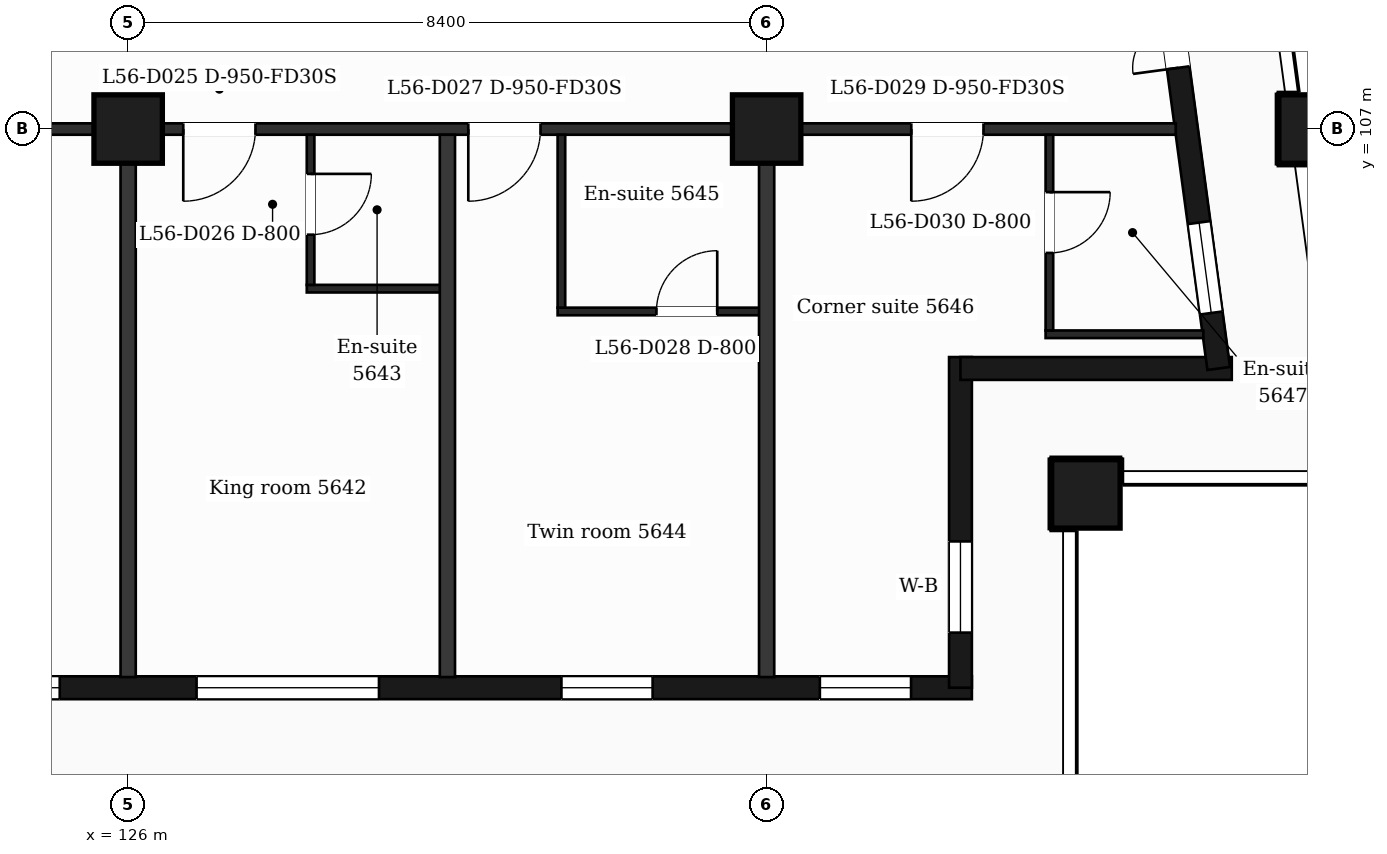
"""IFC4 building model, lengths in metres.
Left out: names, types, materials, properties, quantities, classifications, styles, units other than length and angle.
Written with IfcOpenShell. Run it as: python <this file> out.ifc"""

import sys

from ifc_helpers import new_model, si_unit, direction, frame, frame_2d, origin, origin_2d, place, context, subcontext, project, spatial, rectangle, extrude, element, fill, save


model = new_model("IFC4")
c1 = context("Model", 3, precision=1e-05, world=origin(), true_north=direction((0.0, 1.0)))
c2 = subcontext(c1, "Body", "Model", "MODEL_VIEW")
j1 = project(units=[si_unit("LENGTHUNIT", "METRE"), si_unit("PLANEANGLEUNIT", "RADIAN")], contexts=[c1])
p1 = place(None, origin())
s1 = spatial("IfcSite", under=j1, at=p1, CompositionType="ELEMENT")
p2 = place(p1, origin())
s2 = spatial("IfcBuilding", under=s1, at=p2, CompositionType="ELEMENT")
p3 = place(p2, frame((0.0, 0.0, 231.8)))
s3 = spatial("IfcBuildingStorey", under=s2, at=p3, CompositionType="ELEMENT", Elevation=231.8)
for number, where, z_axis, x_axis in (
    (1, (138.6, 102.2, 0.0), (0.0, 0.0, 1.0), (1.0, 0.0, 0.0)),
    (2, (126.0, 107.0, 0.0), (0.0, 0.0, 1.0), (1.0, 0.0, 0.0)),
    (3, (134.4, 107.0, 0.0), (0.0, 0.0, 1.0), (1.0, 0.0, 0.0)),
    (4, (141.588, 107.0, 0.0), (0.0, 0.0, 1.0), (1.0, 0.0, 0.0)),
):
    element("IfcColumn", number, at=place(p3, frame(where, z_axis=z_axis, x_axis=x_axis)), inside=s3, PredefinedType="COLUMN", context=c2, shape_type="SweptSolid", body=[
        extrude(rectangle(XDim=0.9, YDim=0.9, at=origin_2d()), origin(), (0.0, 0.0, 1.0), 3.7),
    ])
p4 = place(p3, frame((89.85, 99.65, 0.0), z_axis=(0.0, 0.0, 1.0), x_axis=(1.0, 0.0, 0.0)))
e5 = element("IfcWall", 5, at=p4, inside=s3, PredefinedType="SOLIDWALL", context=c2, shape_type="SweptSolid", body=[
    extrude(rectangle(XDim=47.25, YDim=0.3, at=frame_2d((23.625, 0.0))), origin(), (0.0, 0.0, 1.0), 3.38),
])
p5 = place(p4, frame((0.725, 0.0, 0.9)))
e6 = element("IfcOpeningElement", 6, at=p5, cuts=e5, PredefinedType="OPENING", context=c2, shape_type="SweptSolid", body=[
    extrude(rectangle(XDim=1.2, YDim=2.1, at=frame_2d((0.6, 1.05))), frame((0.0, 0.16, 0.0), z_axis=(0.0, -1.0, 0.0), x_axis=(1.0, 0.0, 0.0)), (0.0, 0.0, 1.0), 0.32),
])
p6 = place(p4, frame((3.45, 0.0, 0.9)))
e7 = element("IfcOpeningElement", 7, at=p6, cuts=e5, PredefinedType="OPENING", context=c2, shape_type="SweptSolid", body=[
    extrude(rectangle(XDim=2.4, YDim=2.1, at=frame_2d((1.2, 1.05))), frame((0.0, 0.16, 0.0), z_axis=(0.0, -1.0, 0.0), x_axis=(1.0, 0.0, 0.0)), (0.0, 0.0, 1.0), 0.32),
])
p7 = place(p4, frame((7.65, 0.0, 0.9)))
e8 = element("IfcOpeningElement", 8, at=p7, cuts=e5, PredefinedType="OPENING", context=c2, shape_type="SweptSolid", body=[
    extrude(rectangle(XDim=2.4, YDim=2.1, at=frame_2d((1.2, 1.05))), frame((0.0, 0.16, 0.0), z_axis=(0.0, -1.0, 0.0), x_axis=(1.0, 0.0, 0.0)), (0.0, 0.0, 1.0), 0.32),
])
p8 = place(p4, frame((12.45, 0.0, 0.9)))
e9 = element("IfcOpeningElement", 9, at=p8, cuts=e5, PredefinedType="OPENING", context=c2, shape_type="SweptSolid", body=[
    extrude(rectangle(XDim=1.2, YDim=2.1, at=frame_2d((0.6, 1.05))), frame((0.0, 0.16, 0.0), z_axis=(0.0, -1.0, 0.0), x_axis=(1.0, 0.0, 0.0)), (0.0, 0.0, 1.0), 0.32),
])
p9 = place(p4, frame((16.65, 0.0, 0.9)))
e10 = element("IfcOpeningElement", 10, at=p9, cuts=e5, PredefinedType="OPENING", context=c2, shape_type="SweptSolid", body=[
    extrude(rectangle(XDim=1.2, YDim=2.1, at=frame_2d((0.6, 1.05))), frame((0.0, 0.16, 0.0), z_axis=(0.0, -1.0, 0.0), x_axis=(1.0, 0.0, 0.0)), (0.0, 0.0, 1.0), 0.32),
])
p10 = place(p4, frame((19.95, 0.0, 0.0)))
e11 = element("IfcOpeningElement", 11, at=p10, cuts=e5, PredefinedType="OPENING", context=c2, shape_type="SweptSolid", body=[
    extrude(rectangle(XDim=1.2, YDim=2.4, at=frame_2d((0.6, 1.2))), frame((0.0, 0.16, 0.0), z_axis=(0.0, -1.0, 0.0), x_axis=(1.0, 0.0, 0.0)), (0.0, 0.0, 1.0), 0.32),
])
p11 = place(p4, frame((21.75, 0.0, 0.9)))
e12 = element("IfcOpeningElement", 12, at=p11, cuts=e5, PredefinedType="OPENING", context=c2, shape_type="SweptSolid", body=[
    extrude(rectangle(XDim=1.2, YDim=2.1, at=frame_2d((0.6, 1.05))), frame((0.0, 0.16, 0.0), z_axis=(0.0, -1.0, 0.0), x_axis=(1.0, 0.0, 0.0)), (0.0, 0.0, 1.0), 0.32),
])
p12 = place(p4, frame((24.45, 0.0, 0.9)))
e13 = element("IfcOpeningElement", 13, at=p12, cuts=e5, PredefinedType="OPENING", context=c2, shape_type="SweptSolid", body=[
    extrude(rectangle(XDim=2.4, YDim=2.1, at=frame_2d((1.2, 1.05))), frame((0.0, 0.16, 0.0), z_axis=(0.0, -1.0, 0.0), x_axis=(1.0, 0.0, 0.0)), (0.0, 0.0, 1.0), 0.32),
])
p13 = place(p4, frame((28.35, 0.0, 0.0)))
e14 = element("IfcOpeningElement", 14, at=p13, cuts=e5, PredefinedType="OPENING", context=c2, shape_type="SweptSolid", body=[
    extrude(rectangle(XDim=1.2, YDim=2.4, at=frame_2d((0.6, 1.2))), frame((0.0, 0.16, 0.0), z_axis=(0.0, -1.0, 0.0), x_axis=(1.0, 0.0, 0.0)), (0.0, 0.0, 1.0), 0.32),
])
p14 = place(p4, frame((30.15, 0.0, 0.9)))
e15 = element("IfcOpeningElement", 15, at=p14, cuts=e5, PredefinedType="OPENING", context=c2, shape_type="SweptSolid", body=[
    extrude(rectangle(XDim=1.2, YDim=2.1, at=frame_2d((0.6, 1.05))), frame((0.0, 0.16, 0.0), z_axis=(0.0, -1.0, 0.0), x_axis=(1.0, 0.0, 0.0)), (0.0, 0.0, 1.0), 0.32),
])
p15 = place(p4, frame((32.85, 0.0, 0.9)))
e16 = element("IfcOpeningElement", 16, at=p15, cuts=e5, PredefinedType="OPENING", context=c2, shape_type="SweptSolid", body=[
    extrude(rectangle(XDim=2.4, YDim=2.1, at=frame_2d((1.2, 1.05))), frame((0.0, 0.16, 0.0), z_axis=(0.0, -1.0, 0.0), x_axis=(1.0, 0.0, 0.0)), (0.0, 0.0, 1.0), 0.32),
])
p16 = place(p4, frame((37.05, 0.0, 0.9)))
e17 = element("IfcOpeningElement", 17, at=p16, cuts=e5, PredefinedType="OPENING", context=c2, shape_type="SweptSolid", body=[
    extrude(rectangle(XDim=2.4, YDim=2.1, at=frame_2d((1.2, 1.05))), frame((0.0, 0.16, 0.0), z_axis=(0.0, -1.0, 0.0), x_axis=(1.0, 0.0, 0.0)), (0.0, 0.0, 1.0), 0.32),
])
p17 = place(p4, frame((41.85, 0.0, 0.9)))
e18 = element("IfcOpeningElement", 18, at=p17, cuts=e5, PredefinedType="OPENING", context=c2, shape_type="SweptSolid", body=[
    extrude(rectangle(XDim=1.2, YDim=2.1, at=frame_2d((0.6, 1.05))), frame((0.0, 0.16, 0.0), z_axis=(0.0, -1.0, 0.0), x_axis=(1.0, 0.0, 0.0)), (0.0, 0.0, 1.0), 0.32),
])
p18 = place(p4, frame((45.25, 0.0, 0.9)))
e19 = element("IfcOpeningElement", 19, at=p18, cuts=e5, PredefinedType="OPENING", context=c2, shape_type="SweptSolid", body=[
    extrude(rectangle(XDim=1.2, YDim=2.1, at=frame_2d((0.6, 1.05))), frame((0.0, 0.16, 0.0), z_axis=(0.0, -1.0, 0.0), x_axis=(1.0, 0.0, 0.0)), (0.0, 0.0, 1.0), 0.32),
])
p19 = place(p3, frame((136.95, 99.65, 0.0), z_axis=(0.0, 0.0, 1.0), x_axis=(0.0, 1.0, 0.0)))
e20 = element("IfcWall", 20, at=p19, inside=s3, PredefinedType="SOLIDWALL", context=c2, shape_type="SweptSolid", body=[
    extrude(rectangle(XDim=4.35, YDim=0.3, at=frame_2d((2.175, 0.0))), origin(), (0.0, 0.0, 1.0), 3.38),
])
p20 = place(p19, frame((0.725, 0.0, 0.9)))
e21 = element("IfcOpeningElement", 21, at=p20, cuts=e20, PredefinedType="OPENING", context=c2, shape_type="SweptSolid", body=[
    extrude(rectangle(XDim=1.2, YDim=2.1, at=frame_2d((0.6, 1.05))), frame((0.0, 0.16, 0.0), z_axis=(0.0, -1.0, 0.0), x_axis=(1.0, 0.0, 0.0)), (0.0, 0.0, 1.0), 0.32),
])
p21 = place(p3, frame((136.95, 103.85, 0.0), z_axis=(0.0, 0.0, 1.0), x_axis=(1.0, 0.0, 0.0)))
e22 = element("IfcWall", 22, at=p21, inside=s3, PredefinedType="SOLIDWALL", context=c2, shape_type="SweptSolid", body=[
    extrude(rectangle(XDim=3.569, YDim=0.3, at=frame_2d((1.785, 0.0))), origin(), (0.0, 0.0, 1.0), 3.38),
])
p22 = place(p3, frame((140.348, 103.85, 0.0), z_axis=(0.0, 0.0, 1.0), x_axis=(-0.133431549479, 0.991058031401, 0.0)))
e23 = element("IfcWall", 23, at=p22, inside=s3, PredefinedType="SOLIDWALL", context=c2, shape_type="SweptSolid", body=[
    extrude(rectangle(XDim=6.609, YDim=0.3, at=frame_2d((3.304, 0.0))), origin(), (0.0, 0.0, 1.0), 3.38),
])
p23 = place(p22, frame((0.737, 0.0, 0.9)))
e24 = element("IfcOpeningElement", 24, at=p23, cuts=e23, PredefinedType="OPENING", context=c2, shape_type="SweptSolid", body=[
    extrude(rectangle(XDim=1.2, YDim=2.1, at=frame_2d((0.6, 1.05))), frame((0.0, 0.16, 0.0), z_axis=(0.0, -1.0, 0.0), x_axis=(1.0, 0.0, 0.0)), (0.0, 0.0, 1.0), 0.32),
])
p24 = place(p22, frame((3.991, 0.0, 0.0)))
e25 = element("IfcOpeningElement", 25, at=p24, cuts=e23, PredefinedType="OPENING", context=c2, shape_type="SweptSolid", body=[
    extrude(rectangle(XDim=1.2, YDim=2.4, at=frame_2d((0.6, 1.2))), frame((0.0, 0.16, 0.0), z_axis=(0.0, -1.0, 0.0), x_axis=(1.0, 0.0, 0.0)), (0.0, 0.0, 1.0), 0.32),
])
p25 = place(p3, frame((138.07, 104.3, 0.0), z_axis=(0.0, 0.0, 1.0), x_axis=(1.0, 0.0, 0.0)))
e26 = element("IfcWall", 26, at=p25, inside=s3, PredefinedType="PARTITIONING", context=c2, shape_type="SweptSolid", body=[
    extrude(rectangle(XDim=2.076, YDim=0.1, at=frame_2d((1.038, 0.0))), origin(), (0.0, 0.0, 1.0), 3.38),
])
p26 = place(p3, frame((131.65, 104.6, 0.0), z_axis=(0.0, 0.0, 1.0), x_axis=(1.0, 0.0, 0.0)))
e27 = element("IfcWall", 27, at=p26, inside=s3, PredefinedType="PARTITIONING", context=c2, shape_type="SweptSolid", body=[
    extrude(rectangle(XDim=2.75, YDim=0.1, at=frame_2d((1.375, 0.0))), origin(), (0.0, 0.0, 1.0), 3.38),
])
p27 = place(p26, frame((1.3, 0.0, 0.0)))
e28 = element("IfcOpeningElement", 28, at=p27, cuts=e27, PredefinedType="OPENING", context=c2, shape_type="SweptSolid", body=[
    extrude(rectangle(XDim=0.8, YDim=2.1, at=frame_2d((0.4, 1.05))), frame((0.0, 0.06, 0.0), z_axis=(0.0, -1.0, 0.0), x_axis=(1.0, 0.0, 0.0)), (0.0, 0.0, 1.0), 0.12),
])
p28 = place(p3, frame((128.35, 104.9, 0.0), z_axis=(0.0, 0.0, 1.0), x_axis=(1.0, 0.0, 0.0)))
e29 = element("IfcWall", 29, at=p28, inside=s3, PredefinedType="PARTITIONING", context=c2, shape_type="SweptSolid", body=[
    extrude(rectangle(XDim=1.85, YDim=0.1, at=frame_2d((0.925, 0.0))), origin(), (0.0, 0.0, 1.0), 3.38),
])
p29 = place(p3, frame((87.018, 107.0, 0.0), z_axis=(0.0, 0.0, 1.0), x_axis=(1.0, 0.0, 0.0)))
e30 = element("IfcWall", 30, at=p29, inside=s3, PredefinedType="PARTITIONING", context=c2, shape_type="SweptSolid", body=[
    extrude(rectangle(XDim=52.765, YDim=0.15, at=frame_2d((26.382, 0.0))), origin(), (0.0, 0.0, 1.0), 3.38),
])
p30 = place(p29, frame((0.707, 0.0, 0.0)))
e31 = element("IfcOpeningElement", 31, at=p30, cuts=e30, PredefinedType="OPENING", context=c2, shape_type="SweptSolid", body=[
    extrude(rectangle(XDim=0.95, YDim=2.1, at=frame_2d((0.475, 1.05))), frame((0.0, 0.085, 0.0), z_axis=(0.0, -1.0, 0.0), x_axis=(1.0, 0.0, 0.0)), (0.0, 0.0, 1.0), 0.17),
])
p31 = place(p29, frame((8.412, 0.0, 0.0)))
e32 = element("IfcOpeningElement", 32, at=p31, cuts=e30, PredefinedType="OPENING", context=c2, shape_type="SweptSolid", body=[
    extrude(rectangle(XDim=1.0, YDim=2.1, at=frame_2d((0.5, 1.05))), frame((0.0, 0.085, 0.0), z_axis=(0.0, -1.0, 0.0), x_axis=(1.0, 0.0, 0.0)), (0.0, 0.0, 1.0), 0.17),
])
p32 = place(p29, frame((20.482, 0.0, 0.0)))
e33 = element("IfcOpeningElement", 33, at=p32, cuts=e30, PredefinedType="OPENING", context=c2, shape_type="SweptSolid", body=[
    extrude(rectangle(XDim=1.0, YDim=2.1, at=frame_2d((0.5, 1.05))), frame((0.0, 0.085, 0.0), z_axis=(0.0, -1.0, 0.0), x_axis=(1.0, 0.0, 0.0)), (0.0, 0.0, 1.0), 0.17),
])
p33 = place(p29, frame((22.882, 0.0, 0.0)))
e34 = element("IfcOpeningElement", 34, at=p33, cuts=e30, PredefinedType="OPENING", context=c2, shape_type="SweptSolid", body=[
    extrude(rectangle(XDim=1.0, YDim=2.1, at=frame_2d((0.5, 1.05))), frame((0.0, 0.085, 0.0), z_axis=(0.0, -1.0, 0.0), x_axis=(1.0, 0.0, 0.0)), (0.0, 0.0, 1.0), 0.17),
])
p34 = place(p29, frame((32.607, 0.0, 0.0)))
e35 = element("IfcOpeningElement", 35, at=p34, cuts=e30, PredefinedType="OPENING", context=c2, shape_type="SweptSolid", body=[
    extrude(rectangle(XDim=1.0, YDim=2.1, at=frame_2d((0.5, 1.05))), frame((0.0, 0.085, 0.0), z_axis=(0.0, -1.0, 0.0), x_axis=(1.0, 0.0, 0.0)), (0.0, 0.0, 1.0), 0.17),
])
p35 = place(p29, frame((39.707, 0.0, 0.0)))
e36 = element("IfcOpeningElement", 36, at=p35, cuts=e30, PredefinedType="OPENING", context=c2, shape_type="SweptSolid", body=[
    extrude(rectangle(XDim=0.95, YDim=2.1, at=frame_2d((0.475, 1.05))), frame((0.0, 0.085, 0.0), z_axis=(0.0, -1.0, 0.0), x_axis=(1.0, 0.0, 0.0)), (0.0, 0.0, 1.0), 0.17),
])
p36 = place(p29, frame((43.457, 0.0, 0.0)))
e37 = element("IfcOpeningElement", 37, at=p36, cuts=e30, PredefinedType="OPENING", context=c2, shape_type="SweptSolid", body=[
    extrude(rectangle(XDim=0.95, YDim=2.1, at=frame_2d((0.475, 1.05))), frame((0.0, 0.085, 0.0), z_axis=(0.0, -1.0, 0.0), x_axis=(1.0, 0.0, 0.0)), (0.0, 0.0, 1.0), 0.17),
])
p37 = place(p29, frame((49.285, 0.0, 0.0)))
e38 = element("IfcOpeningElement", 38, at=p37, cuts=e30, PredefinedType="OPENING", context=c2, shape_type="SweptSolid", body=[
    extrude(rectangle(XDim=0.95, YDim=2.1, at=frame_2d((0.475, 1.05))), frame((0.0, 0.085, 0.0), z_axis=(0.0, -1.0, 0.0), x_axis=(1.0, 0.0, 0.0)), (0.0, 0.0, 1.0), 0.17),
])
p38 = place(p3, frame((126.0, 99.79, 0.0), z_axis=(0.0, 0.0, 1.0), x_axis=(0.0, 1.0, 0.0)))
e39 = element("IfcWall", 39, at=p38, inside=s3, PredefinedType="PARTITIONING", context=c2, shape_type="SweptSolid", body=[
    extrude(rectangle(XDim=7.135, YDim=0.2, at=frame_2d((3.567, 0.0))), origin(), (0.0, 0.0, 1.0), 3.38),
])
p39 = place(p3, frame((128.4, 104.95, 0.0), z_axis=(0.0, 0.0, 1.0), x_axis=(0.0, 1.0, 0.0)))
e40 = element("IfcWall", 40, at=p39, inside=s3, PredefinedType="PARTITIONING", context=c2, shape_type="SweptSolid", body=[
    extrude(rectangle(XDim=1.975, YDim=0.1, at=frame_2d((0.988, 0.0))), origin(), (0.0, 0.0, 1.0), 3.38),
])
p40 = place(p39, frame((0.66, 0.0, 0.0)))
e41 = element("IfcOpeningElement", 41, at=p40, cuts=e40, PredefinedType="OPENING", context=c2, shape_type="SweptSolid", body=[
    extrude(rectangle(XDim=0.8, YDim=2.1, at=frame_2d((0.4, 1.05))), frame((0.0, 0.06, 0.0), z_axis=(0.0, -1.0, 0.0), x_axis=(1.0, 0.0, 0.0)), (0.0, 0.0, 1.0), 0.12),
])
p41 = place(p3, frame((130.2, 99.79, 0.0), z_axis=(0.0, 0.0, 1.0), x_axis=(0.0, 1.0, 0.0)))
e42 = element("IfcWall", 42, at=p41, inside=s3, PredefinedType="PARTITIONING", context=c2, shape_type="SweptSolid", body=[
    extrude(rectangle(XDim=7.135, YDim=0.2, at=frame_2d((3.567, 0.0))), origin(), (0.0, 0.0, 1.0), 3.38),
])
p42 = place(p3, frame((131.7, 104.65, 0.0), z_axis=(0.0, 0.0, 1.0), x_axis=(0.0, 1.0, 0.0)))
e43 = element("IfcWall", 43, at=p42, inside=s3, PredefinedType="PARTITIONING", context=c2, shape_type="SweptSolid", body=[
    extrude(rectangle(XDim=2.275, YDim=0.1, at=frame_2d((1.138, 0.0))), origin(), (0.0, 0.0, 1.0), 3.38),
])
p43 = place(p3, frame((134.4, 99.79, 0.0), z_axis=(0.0, 0.0, 1.0), x_axis=(0.0, 1.0, 0.0)))
e44 = element("IfcWall", 44, at=p43, inside=s3, PredefinedType="PARTITIONING", context=c2, shape_type="SweptSolid", body=[
    extrude(rectangle(XDim=7.135, YDim=0.2, at=frame_2d((3.567, 0.0))), origin(), (0.0, 0.0, 1.0), 3.38),
])
p44 = place(p3, frame((138.12, 104.35, 0.0), z_axis=(0.0, 0.0, 1.0), x_axis=(0.0, 1.0, 0.0)))
e45 = element("IfcWall", 45, at=p44, inside=s3, PredefinedType="PARTITIONING", context=c2, shape_type="SweptSolid", body=[
    extrude(rectangle(XDim=2.575, YDim=0.1, at=frame_2d((1.288, 0.0))), origin(), (0.0, 0.0, 1.0), 3.38),
])
p45 = place(p44, frame((1.02, 0.0, 0.0)))
e46 = element("IfcOpeningElement", 46, at=p45, cuts=e45, PredefinedType="OPENING", context=c2, shape_type="SweptSolid", body=[
    extrude(rectangle(XDim=0.8, YDim=2.1, at=frame_2d((0.4, 1.05))), frame((0.0, 0.06, 0.0), z_axis=(0.0, -1.0, 0.0), x_axis=(1.0, 0.0, 0.0)), (0.0, 0.0, 1.0), 0.12),
])
p46 = place(p15, origin())
e47 = element("IfcWindow", 47, at=p46, inside=s3, PartitioningType="SINGLE_PANEL", PredefinedType="WINDOW", context=c2, shape_type="SweptSolid", body=[
    extrude(rectangle(XDim=2.4, YDim=2.1, at=frame_2d((1.2, 1.05))), frame((0.0, 0.03, 0.0), z_axis=(0.0, -1.0, 0.0), x_axis=(1.0, 0.0, 0.0)), (0.0, 0.0, 1.0), 0.06),
])
fill(e16, e47)
p47 = place(p16, origin())
e48 = element("IfcWindow", 48, at=p47, inside=s3, PartitioningType="SINGLE_PANEL", PredefinedType="WINDOW", context=c2, shape_type="SweptSolid", body=[
    extrude(rectangle(XDim=2.4, YDim=2.1, at=frame_2d((1.2, 1.05))), frame((0.0, 0.03, 0.0), z_axis=(0.0, -1.0, 0.0), x_axis=(1.0, 0.0, 0.0)), (0.0, 0.0, 1.0), 0.06),
])
fill(e17, e48)
p48 = place(p17, origin())
e49 = element("IfcWindow", 49, at=p48, inside=s3, PartitioningType="SINGLE_PANEL", PredefinedType="WINDOW", context=c2, shape_type="SweptSolid", body=[
    extrude(rectangle(XDim=1.2, YDim=2.1, at=frame_2d((0.6, 1.05))), frame((0.0, 0.03, 0.0), z_axis=(0.0, -1.0, 0.0), x_axis=(1.0, 0.0, 0.0)), (0.0, 0.0, 1.0), 0.06),
])
fill(e18, e49)
p49 = place(p18, origin())
e50 = element("IfcWindow", 50, at=p49, inside=s3, PartitioningType="SINGLE_PANEL", PredefinedType="WINDOW", context=c2, shape_type="SweptSolid", body=[
    extrude(rectangle(XDim=1.2, YDim=2.1, at=frame_2d((0.6, 1.05))), frame((0.0, 0.03, 0.0), z_axis=(0.0, -1.0, 0.0), x_axis=(1.0, 0.0, 0.0)), (0.0, 0.0, 1.0), 0.06),
])
fill(e19, e50)
p50 = place(p20, origin())
e51 = element("IfcWindow", 51, at=p50, inside=s3, PartitioningType="SINGLE_PANEL", PredefinedType="WINDOW", context=c2, shape_type="SweptSolid", body=[
    extrude(rectangle(XDim=1.2, YDim=2.1, at=frame_2d((0.6, 1.05))), frame((0.0, 0.03, 0.0), z_axis=(0.0, -1.0, 0.0), x_axis=(1.0, 0.0, 0.0)), (0.0, 0.0, 1.0), 0.06),
])
fill(e21, e51)
p51 = place(p23, origin())
e52 = element("IfcWindow", 52, at=p51, inside=s3, PartitioningType="SINGLE_PANEL", PredefinedType="WINDOW", context=c2, shape_type="SweptSolid", body=[
    extrude(rectangle(XDim=1.2, YDim=2.1, at=frame_2d((0.6, 1.05))), frame((0.0, 0.03, 0.0), z_axis=(0.0, -1.0, 0.0), x_axis=(1.0, 0.0, 0.0)), (0.0, 0.0, 1.0), 0.06),
])
fill(e24, e52)
p52 = place(p24, origin())
e53 = element("IfcDoor", 53, at=p52, inside=s3, OperationType="DOUBLE_DOOR_SINGLE_SWING", PredefinedType="DOOR", context=c2, shape_type="SweptSolid", body=[
    extrude(rectangle(XDim=1.2, YDim=2.4, at=frame_2d((0.6, 1.2))), frame((0.0, 0.025, 0.0), z_axis=(0.0, -1.0, 0.0), x_axis=(1.0, 0.0, 0.0)), (0.0, 0.0, 1.0), 0.05),
])
fill(e25, e53)
p53 = place(p35, origin())
e54 = element("IfcDoor", 54, at=p53, inside=s3, OperationType="SINGLE_SWING_LEFT", PredefinedType="DOOR", context=c2, shape_type="SweptSolid", body=[
    extrude(rectangle(XDim=0.95, YDim=2.1, at=frame_2d((0.475, 1.05))), frame((0.0, 0.025, 0.0), z_axis=(0.0, -1.0, 0.0), x_axis=(1.0, 0.0, 0.0)), (0.0, 0.0, 1.0), 0.05),
])
fill(e36, e54)
p54 = place(p40, origin())
e55 = element("IfcDoor", 55, at=p54, inside=s3, OperationType="SINGLE_SWING_RIGHT", PredefinedType="DOOR", context=c2, shape_type="SweptSolid", body=[
    extrude(rectangle(XDim=0.8, YDim=2.1, at=frame_2d((0.4, 1.05))), frame((0.0, 0.025, 0.0), z_axis=(0.0, -1.0, 0.0), x_axis=(1.0, 0.0, 0.0)), (0.0, 0.0, 1.0), 0.05),
])
fill(e41, e55)
p55 = place(p36, origin())
e56 = element("IfcDoor", 56, at=p55, inside=s3, OperationType="SINGLE_SWING_LEFT", PredefinedType="DOOR", context=c2, shape_type="SweptSolid", body=[
    extrude(rectangle(XDim=0.95, YDim=2.1, at=frame_2d((0.475, 1.05))), frame((0.0, 0.025, 0.0), z_axis=(0.0, -1.0, 0.0), x_axis=(1.0, 0.0, 0.0)), (0.0, 0.0, 1.0), 0.05),
])
fill(e37, e56)
p56 = place(p27, origin())
e57 = element("IfcDoor", 57, at=p56, inside=s3, OperationType="SINGLE_SWING_RIGHT", PredefinedType="DOOR", context=c2, shape_type="SweptSolid", body=[
    extrude(rectangle(XDim=0.8, YDim=2.1, at=frame_2d((0.4, 1.05))), frame((0.0, 0.025, 0.0), z_axis=(0.0, -1.0, 0.0), x_axis=(1.0, 0.0, 0.0)), (0.0, 0.0, 1.0), 0.05),
])
fill(e28, e57)
p57 = place(p37, origin())
e58 = element("IfcDoor", 58, at=p57, inside=s3, OperationType="SINGLE_SWING_LEFT", PredefinedType="DOOR", context=c2, shape_type="SweptSolid", body=[
    extrude(rectangle(XDim=0.95, YDim=2.1, at=frame_2d((0.475, 1.05))), frame((0.0, 0.025, 0.0), z_axis=(0.0, -1.0, 0.0), x_axis=(1.0, 0.0, 0.0)), (0.0, 0.0, 1.0), 0.05),
])
fill(e38, e58)
p58 = place(p45, origin())
e59 = element("IfcDoor", 59, at=p58, inside=s3, OperationType="SINGLE_SWING_RIGHT", PredefinedType="DOOR", context=c2, shape_type="SweptSolid", body=[
    extrude(rectangle(XDim=0.8, YDim=2.1, at=frame_2d((0.4, 1.05))), frame((0.0, 0.025, 0.0), z_axis=(0.0, -1.0, 0.0), x_axis=(1.0, 0.0, 0.0)), (0.0, 0.0, 1.0), 0.05),
])
fill(e46, e59)
save(model, sys.argv[1])
